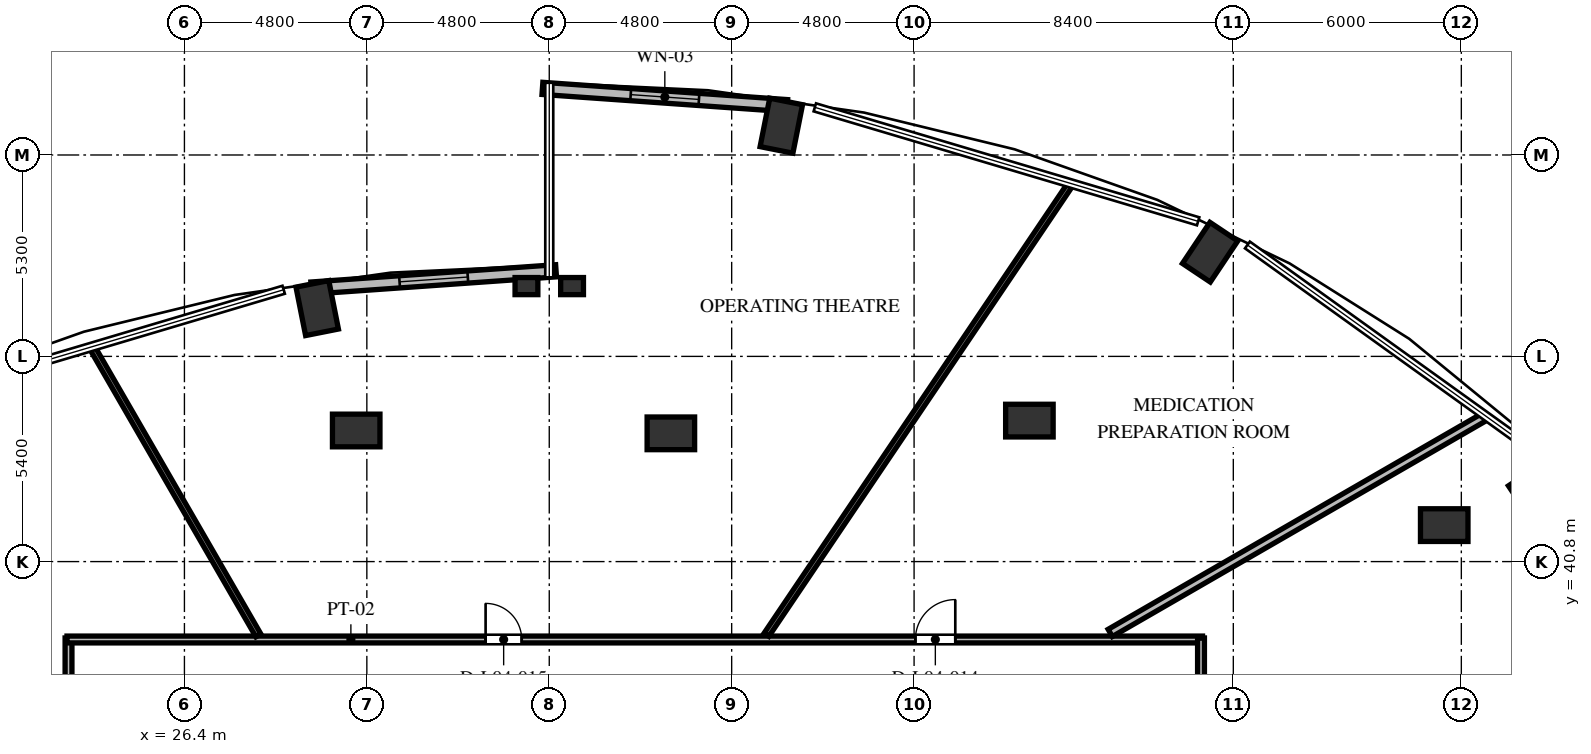
"""IFC4 building model, lengths in metres.
Left out: names, types, materials, properties, quantities, classifications, styles, units other than length and angle.
Written with IfcOpenShell. Run it as: python <this file> out.ifc"""

import sys

from ifc_helpers import new_model, si_unit, direction, frame, frame_2d, origin, origin_2d, place, context, subcontext, project, spatial, rectangle, extrude, element, fill, save


model = new_model("IFC4")
c1 = context("Model", 3, precision=1e-05, world=origin(), true_north=direction((0.0, 1.0)))
c2 = subcontext(c1, "Body", "Model", "MODEL_VIEW")
j1 = project(units=[si_unit("LENGTHUNIT", "METRE"), si_unit("PLANEANGLEUNIT", "RADIAN")], contexts=[c1])
p1 = place(None, origin())
s1 = spatial("IfcSite", under=j1, at=p1, CompositionType="ELEMENT")
p2 = place(p1, origin())
s2 = spatial("IfcBuilding", under=s1, at=p2, CompositionType="ELEMENT")
p3 = place(p2, frame((0.0, 0.0, 20.4)))
s3 = spatial("IfcBuildingStorey", under=s2, at=p3, CompositionType="ELEMENT", Elevation=20.4)
for number, where, z_axis, x_axis in (
    (1, (62.025, 42.789, 0.0), (0.0, 0.0, 1.0), (0.831, 0.556, 0.0)),
    (2, (53.389, 48.942, 0.0), (0.0, 0.0, 1.0), (0.556, 0.831, 0.0)),
    (3, (42.106, 52.271, 0.0), (0.0, 0.0, 1.0), (0.195, 0.981, 0.0)),
    (4, (29.894, 47.471, 0.0), (0.0, 0.0, 1.0), (-0.195, 0.981, 0.0)),
):
    element("IfcColumn", number, at=place(p3, frame(where, z_axis=z_axis, x_axis=x_axis)), inside=s3, PredefinedType="COLUMN", context=c2, shape_type="SweptSolid", body=[
        extrude(rectangle(XDim=1.3, YDim=0.88, at=origin_2d()), origin(), (0.0, 0.0, 1.0), 4.8),
    ])
for number, where, z_axis, x_axis in (
    (5, (59.55, 41.76, 0.0), (0.0, 0.0, 1.0), (1.0, 0.0, 0.0)),
    (6, (48.634, 44.51, 0.0), (0.0, 0.0, 1.0), (1.0, 0.0, 0.0)),
    (7, (39.2, 44.175, 0.0), (0.0, 0.0, 1.0), (1.0, 0.0, 0.0)),
    (8, (30.92, 44.25, 0.0), (0.0, 0.0, 1.0), (1.0, 0.0, 0.0)),
):
    element("IfcColumn", number, at=place(p3, frame(where, z_axis=z_axis, x_axis=x_axis)), inside=s3, PredefinedType="COLUMN", context=c2, shape_type="SweptSolid", body=[
        extrude(rectangle(XDim=1.25, YDim=0.86, at=origin_2d()), origin(), (0.0, 0.0, 1.0), 4.8),
    ])
for number, where, z_axis, x_axis in (
    (9, (35.4, 48.05, 0.0), (0.0, 0.0, 1.0), (1.0, 0.0, 0.0)),
    (10, (36.6, 48.05, 0.0), (0.0, 0.0, 1.0), (1.0, 0.0, 0.0)),
):
    element("IfcColumn", number, at=place(p3, frame(where, z_axis=z_axis, x_axis=x_axis)), inside=s3, PredefinedType="PILASTER", context=c2, shape_type="SweptSolid", body=[
        extrude(rectangle(XDim=0.6, YDim=0.45, at=origin_2d()), origin(), (0.0, 0.0, 1.0), 4.8),
    ])
p4 = place(p3, frame((42.262, 52.798, 0.0), z_axis=(0.0, 0.0, 1.0), x_axis=(-0.99751367159, 0.070473221795, 0.0)))
e11 = element("IfcWall", 11, at=p4, inside=s3, PredefinedType="SOLIDWALL", context=c2, shape_type="SweptSolid", body=[
    extrude(rectangle(XDim=6.458, YDim=0.32, at=frame_2d((3.229, 0.0))), origin(), (0.0, 0.0, 1.0), 4.58),
])
p5 = place(p4, frame((2.329, 0.0, 0.85)))
e12 = element("IfcOpeningElement", 12, at=p5, cuts=e11, PredefinedType="OPENING", context=c2, shape_type="SweptSolid", body=[
    extrude(rectangle(XDim=1.8, YDim=2.4, at=frame_2d((0.9, 1.2))), frame((0.0, 0.17, 0.0), z_axis=(0.0, -1.0, 0.0), x_axis=(1.0, 0.0, 0.0)), (0.0, 0.0, 1.0), 0.34),
])
p6 = place(p3, frame((36.179, 48.453, 0.0), z_axis=(0.0, 0.0, 1.0), x_axis=(-0.997513108184, -0.070481196075, 0.0)))
e13 = element("IfcWall", 13, at=p6, inside=s3, PredefinedType="SOLIDWALL", context=c2, shape_type="SweptSolid", body=[
    extrude(rectangle(XDim=6.457, YDim=0.32, at=frame_2d((3.229, 0.0))), origin(), (0.0, 0.0, 1.0), 4.58),
])
p7 = place(p6, frame((2.328, 0.0, 0.85)))
e14 = element("IfcOpeningElement", 14, at=p7, cuts=e13, PredefinedType="OPENING", context=c2, shape_type="SweptSolid", body=[
    extrude(rectangle(XDim=1.8, YDim=2.4, at=frame_2d((0.9, 1.2))), frame((0.0, 0.17, 0.0), z_axis=(0.0, -1.0, 0.0), x_axis=(1.0, 0.0, 0.0)), (0.0, 0.0, 1.0), 0.34),
])
p8 = place(p3, frame((23.35, 29.36, 0.0), z_axis=(0.0, 0.0, 1.0), x_axis=(0.0, 1.0, 0.0)))
e15 = element("IfcWall", 15, at=p8, inside=s3, PredefinedType="PARTITIONING", context=c2, shape_type="SweptSolid", body=[
    extrude(rectangle(XDim=9.43, YDim=0.18, at=frame_2d((4.715, 0.0))), origin(), (0.0, 0.0, 1.0), 4.58),
])
p9 = place(p8, frame((4.298, 0.0, 0.0)))
e16 = element("IfcOpeningElement", 16, at=p9, cuts=e15, PredefinedType="OPENING", context=c2, shape_type="SweptSolid", body=[
    extrude(rectangle(XDim=1.4, YDim=2.2, at=frame_2d((0.7, 1.1))), frame((0.0, 0.1, 0.0), z_axis=(0.0, -1.0, 0.0), x_axis=(1.0, 0.0, 0.0)), (0.0, 0.0, 1.0), 0.2),
])
p10 = place(p3, frame((23.31, 38.75, 0.0), z_axis=(0.0, 0.0, 1.0), x_axis=(1.0, 0.0, 0.0)))
e17 = element("IfcWall", 17, at=p10, inside=s3, PredefinedType="PARTITIONING", context=c2, shape_type="SweptSolid", body=[
    extrude(rectangle(XDim=29.88, YDim=0.18, at=frame_2d((14.94, 0.0))), origin(), (0.0, 0.0, 1.0), 4.58),
])
p11 = place(p10, frame((22.324, 0.0, 0.0)))
e18 = element("IfcOpeningElement", 18, at=p11, cuts=e17, PredefinedType="OPENING", context=c2, shape_type="SweptSolid", body=[
    extrude(rectangle(XDim=1.05, YDim=2.15, at=frame_2d((0.525, 1.075))), frame((0.0, 0.1, 0.0), z_axis=(0.0, -1.0, 0.0), x_axis=(1.0, 0.0, 0.0)), (0.0, 0.0, 1.0), 0.2),
])
p12 = place(p10, frame((11.015, 0.0, 0.0)))
e19 = element("IfcOpeningElement", 19, at=p12, cuts=e17, PredefinedType="OPENING", context=c2, shape_type="SweptSolid", body=[
    extrude(rectangle(XDim=0.95, YDim=2.1, at=frame_2d((0.475, 1.05))), frame((0.0, 0.1, 0.0), z_axis=(0.0, -1.0, 0.0), x_axis=(1.0, 0.0, 0.0)), (0.0, 0.0, 1.0), 0.2),
])
p13 = place(p3, frame((53.15, 38.79, 0.0), z_axis=(0.0, 0.0, 1.0), x_axis=(0.0, -1.0, 0.0)))
e20 = element("IfcWall", 20, at=p13, inside=s3, PredefinedType="PARTITIONING", context=c2, shape_type="SweptSolid", body=[
    extrude(rectangle(XDim=9.43, YDim=0.18, at=frame_2d((4.715, 0.0))), origin(), (0.0, 0.0, 1.0), 4.265),
])
p14 = place(p13, frame((3.226, 0.0, 0.0)))
e21 = element("IfcOpeningElement", 21, at=p14, cuts=e20, PredefinedType="OPENING", context=c2, shape_type="SweptSolid", body=[
    extrude(rectangle(XDim=1.05, YDim=2.15, at=frame_2d((0.525, 1.075))), frame((0.0, 0.1, 0.0), z_axis=(0.0, -1.0, 0.0), x_axis=(1.0, 0.0, 0.0)), (0.0, 0.0, 1.0), 0.2),
])
p15 = place(p3, frame((50.761, 38.923, 0.0), z_axis=(0.0, 0.0, 1.0), x_axis=(0.866026972346, 0.499997283162, 0.0)))
e22 = element("IfcWall", 22, at=p15, inside=s3, PredefinedType="PARTITIONING", context=c2, shape_type="SweptSolid", body=[
    extrude(rectangle(XDim=11.406, YDim=0.22, at=frame_2d((5.703, 0.0))), origin(), (0.0, 0.0, 1.0), 4.58),
])
p16 = place(p3, frame((41.717, 38.875, 0.0), z_axis=(0.0, 0.0, 1.0), x_axis=(0.559191016445, 0.829038845367, 0.0)))
e23 = element("IfcWall", 23, at=p16, inside=s3, PredefinedType="PARTITIONING", context=c2, shape_type="SweptSolid", body=[
    extrude(rectangle(XDim=14.314, YDim=0.15, at=frame_2d((7.157, 0.0))), origin(), (0.0, 0.0, 1.0), 4.58),
])
p17 = place(p3, frame((28.346, 38.857, 0.0), z_axis=(0.0, 0.0, 1.0), x_axis=(-0.500008731563, 0.866020362555, 0.0)))
e24 = element("IfcWall", 24, at=p17, inside=s3, PredefinedType="PARTITIONING", context=c2, shape_type="SweptSolid", body=[
    extrude(rectangle(XDim=8.76, YDim=0.15, at=frame_2d((4.38, 0.0))), origin(), (0.0, 0.0, 1.0), 4.58),
])
p18 = place(p5, origin())
e25 = element("IfcWindow", 25, at=p18, inside=s3, PartitioningType="SINGLE_PANEL", PredefinedType="WINDOW", context=c2, shape_type="SweptSolid", body=[
    extrude(rectangle(XDim=1.8, YDim=2.4, at=frame_2d((0.9, 1.2))), frame((0.0, 0.03, 0.0), z_axis=(0.0, -1.0, 0.0), x_axis=(1.0, 0.0, 0.0)), (0.0, 0.0, 1.0), 0.06),
])
fill(e12, e25)
p19 = place(p7, origin())
e26 = element("IfcWindow", 26, at=p19, inside=s3, PartitioningType="SINGLE_PANEL", PredefinedType="WINDOW", context=c2, shape_type="SweptSolid", body=[
    extrude(rectangle(XDim=1.8, YDim=2.4, at=frame_2d((0.9, 1.2))), frame((0.0, 0.03, 0.0), z_axis=(0.0, -1.0, 0.0), x_axis=(1.0, 0.0, 0.0)), (0.0, 0.0, 1.0), 0.06),
])
fill(e14, e26)
p20 = place(p11, origin())
e27 = element("IfcDoor", 27, at=p20, inside=s3, OperationType="SINGLE_SWING_RIGHT", PredefinedType="DOOR", context=c2, shape_type="SweptSolid", body=[
    extrude(rectangle(XDim=1.05, YDim=2.15, at=frame_2d((0.525, 1.075))), frame((0.0, 0.025, 0.0), z_axis=(0.0, -1.0, 0.0), x_axis=(1.0, 0.0, 0.0)), (0.0, 0.0, 1.0), 0.05),
])
fill(e18, e27)
p21 = place(p12, origin())
e28 = element("IfcDoor", 28, at=p21, inside=s3, OperationType="SINGLE_SWING_LEFT", PredefinedType="DOOR", context=c2, shape_type="SweptSolid", body=[
    extrude(rectangle(XDim=0.95, YDim=2.1, at=frame_2d((0.475, 1.05))), frame((0.0, 0.025, 0.0), z_axis=(0.0, -1.0, 0.0), x_axis=(1.0, 0.0, 0.0)), (0.0, 0.0, 1.0), 0.05),
])
fill(e19, e28)
save(model, sys.argv[1])
